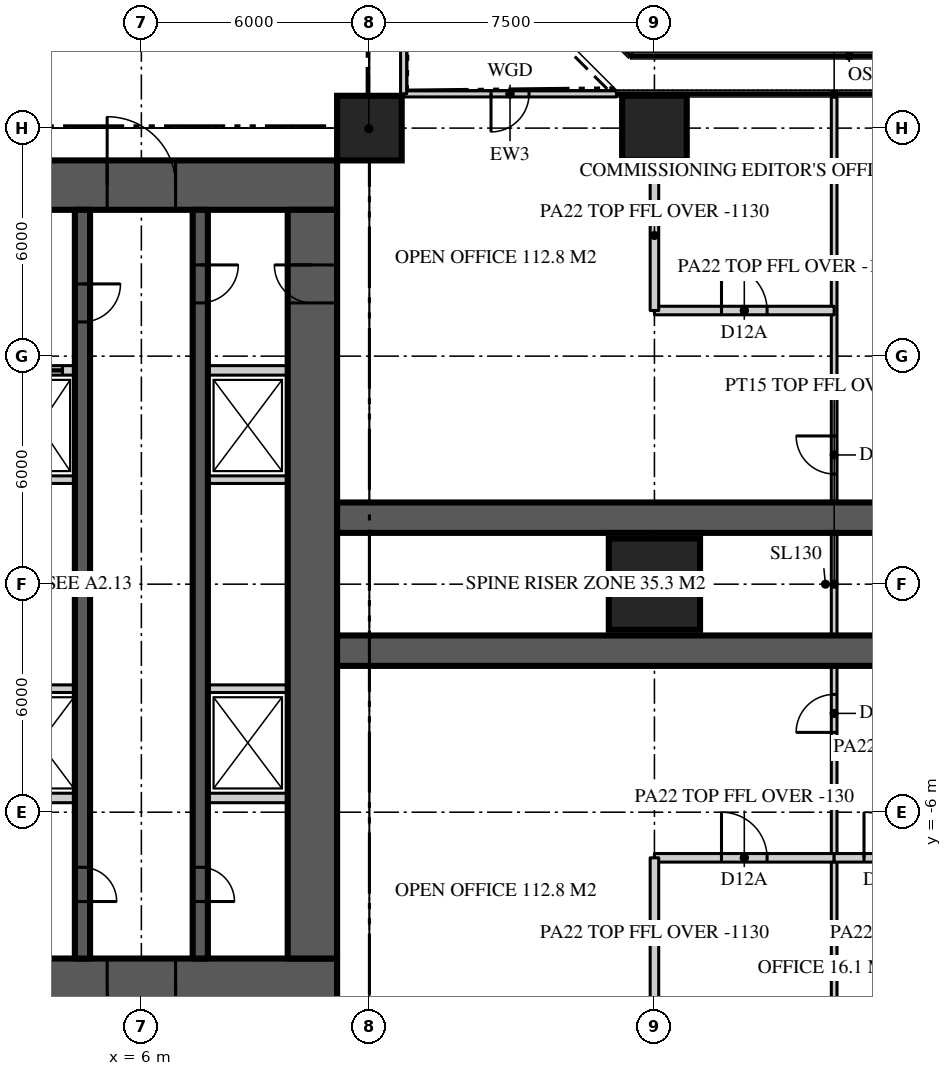
"""IFC4 building model, lengths in metres.
Left out: names, types, materials, properties, quantities, classifications, styles, units other than length and angle.
Written with IfcOpenShell. Run it as: python <this file> out.ifc"""

import sys

from ifc_helpers import new_model, si_unit, direction, frame, frame_2d, origin, origin_2d, place, context, subcontext, project, spatial, rectangle, extrude, element, fill, save


model = new_model("IFC4")
c1 = context("Model", 3, precision=1e-05, world=origin(), true_north=direction((0.0, 1.0)))
c2 = subcontext(c1, "Body", "Model", "MODEL_VIEW")
j1 = project(units=[si_unit("LENGTHUNIT", "METRE"), si_unit("PLANEANGLEUNIT", "RADIAN")], contexts=[c1])
p1 = place(None, origin())
s1 = spatial("IfcSite", under=j1, at=p1, CompositionType="ELEMENT")
p2 = place(p1, origin())
s2 = spatial("IfcBuilding", under=s1, at=p2, CompositionType="ELEMENT")
p3 = place(p2, frame((0.0, 0.0, 78.6)))
s3 = spatial("IfcBuildingStorey", under=s2, at=p3, CompositionType="ELEMENT", Elevation=78.6)
p4 = place(p3, frame((-11.15, 10.5, 0.0), z_axis=(0.0, 0.0, 1.0), x_axis=(1.0, 0.0, 0.0)))
e1 = element("IfcWall", 1, at=p4, inside=s3, PredefinedType="SHEAR", context=c2, shape_type="SweptSolid", body=[
    extrude(rectangle(XDim=22.3, YDim=1.3, at=frame_2d((11.15, 0.0))), origin(), (0.0, 0.0, 1.0), 3.9),
])
p5 = place(p4, frame((4.25, 0.0, 0.0)))
e2 = element("IfcOpeningElement", 2, at=p5, cuts=e1, PredefinedType="OPENING", context=c2, shape_type="SweptSolid", body=[
    extrude(rectangle(XDim=1.8, YDim=2.2, at=frame_2d((0.9, 1.1))), frame((0.0, 0.66, 0.0), z_axis=(0.0, -1.0, 0.0), x_axis=(1.0, 0.0, 0.0)), (0.0, 0.0, 1.0), 1.32),
])
p6 = place(p4, frame((16.25, 0.0, 0.0)))
e3 = element("IfcOpeningElement", 3, at=p6, cuts=e1, PredefinedType="OPENING", context=c2, shape_type="SweptSolid", body=[
    extrude(rectangle(XDim=1.8, YDim=2.2, at=frame_2d((0.9, 1.1))), frame((0.0, 0.66, 0.0), z_axis=(0.0, -1.0, 0.0), x_axis=(1.0, 0.0, 0.0)), (0.0, 0.0, 1.0), 1.32),
])
p7 = place(p3, frame((11.15, -10.5, 0.0), z_axis=(0.0, 0.0, 1.0), x_axis=(-1.0, 0.0, 0.0)))
e4 = element("IfcWall", 4, at=p7, inside=s3, PredefinedType="SHEAR", context=c2, shape_type="SweptSolid", body=[
    extrude(rectangle(XDim=22.3, YDim=1.3, at=frame_2d((11.15, 0.0))), origin(), (0.0, 0.0, 1.0), 3.9),
])
p8 = place(p7, frame((16.25, 0.0, 0.0)))
e5 = element("IfcOpeningElement", 5, at=p8, cuts=e4, PredefinedType="OPENING", context=c2, shape_type="SweptSolid", body=[
    extrude(rectangle(XDim=1.8, YDim=2.2, at=frame_2d((0.9, 1.1))), frame((0.0, 0.66, 0.0), z_axis=(0.0, -1.0, 0.0), x_axis=(1.0, 0.0, 0.0)), (0.0, 0.0, 1.0), 1.32),
])
p9 = place(p7, frame((4.25, 0.0, 0.0)))
e6 = element("IfcOpeningElement", 6, at=p9, cuts=e4, PredefinedType="OPENING", context=c2, shape_type="SweptSolid", body=[
    extrude(rectangle(XDim=1.8, YDim=2.2, at=frame_2d((0.9, 1.1))), frame((0.0, 0.66, 0.0), z_axis=(0.0, -1.0, 0.0), x_axis=(1.0, 0.0, 0.0)), (0.0, 0.0, 1.0), 1.32),
])
p10 = place(p3, frame((10.5, -9.85, 0.0), z_axis=(0.0, 0.0, 1.0), x_axis=(0.0, 1.0, 0.0)))
e7 = element("IfcWall", 7, at=p10, inside=s3, PredefinedType="SHEAR", context=c2, shape_type="SweptSolid", body=[
    extrude(rectangle(XDim=19.7, YDim=1.3, at=frame_2d((9.85, 0.0))), origin(), (0.0, 0.0, 1.0), 3.9),
])
p11 = place(p10, frame((17.25, 0.0, 0.0)))
e8 = element("IfcOpeningElement", 8, at=p11, cuts=e7, PredefinedType="OPENING", context=c2, shape_type="SweptSolid", body=[
    extrude(rectangle(XDim=1.0, YDim=2.2, at=frame_2d((0.5, 1.1))), frame((0.0, 0.66, 0.0), z_axis=(0.0, -1.0, 0.0), x_axis=(1.0, 0.0, 0.0)), (0.0, 0.0, 1.0), 1.32),
])
for number, where, z_axis, x_axis in (
    (9, (11.15, -1.75, 0.0), (0.0, 0.0, 1.0), (1.0, 0.0, 0.0)),
    (10, (11.15, 1.75, 0.0), (0.0, 0.0, 1.0), (1.0, 0.0, 0.0)),
):
    element("IfcWall", number, at=place(p3, frame(where, z_axis=z_axis, x_axis=x_axis)), inside=s3, PredefinedType="SHEAR", context=c2, shape_type="SweptSolid", body=[
        extrude(rectangle(XDim=15.25, YDim=0.8, at=frame_2d((7.625, 0.0))), origin(), (0.0, 0.0, 1.0), 3.9),
    ])
p12 = place(p3, frame((19.5, 0.0, 0.0), z_axis=(0.0, 0.0, 1.0), x_axis=(1.0, 0.0, 0.0)))
e11 = element("IfcColumn", 11, at=p12, inside=s3, PredefinedType="COLUMN", context=c2, shape_type="SweptSolid", body=[
    extrude(rectangle(XDim=2.4, YDim=2.4, at=origin_2d()), origin(), (0.0, 0.0, 1.0), 3.9),
])
for number, where, z_axis, x_axis in (
    (12, (12.0, 12.0, 0.0), (0.0, 0.0, 1.0), (1.0, 0.0, 0.0)),
    (13, (19.5, 12.0, 0.0), (0.0, 0.0, 1.0), (1.0, 0.0, 0.0)),
):
    element("IfcColumn", number, at=place(p3, frame(where, z_axis=z_axis, x_axis=x_axis)), inside=s3, PredefinedType="COLUMN", context=c2, shape_type="SweptSolid", body=[
        extrude(rectangle(XDim=1.7, YDim=1.7, at=origin_2d()), origin(), (0.0, 0.0, 1.0), 3.9),
    ])
p13 = place(p3, frame((18.5, 12.9, 0.0), z_axis=(0.0, 0.0, 1.0), x_axis=(-1.0, 0.0, 0.0)))
e14 = element("IfcWall", 14, at=p13, inside=s3, PredefinedType="SOLIDWALL", context=c2, shape_type="SweptSolid", body=[
    extrude(rectangle(XDim=5.6, YDim=0.16, at=frame_2d((2.8, 0.0))), origin(), (0.0, 0.0, 1.0), 3.77),
])
p14 = place(p13, frame((2.3, 0.0, 0.0)))
e15 = element("IfcOpeningElement", 15, at=p14, cuts=e14, PredefinedType="OPENING", context=c2, shape_type="SweptSolid", body=[
    extrude(rectangle(XDim=1.0, YDim=2.2, at=frame_2d((0.5, 1.1))), frame((0.0, 0.09, 0.0), z_axis=(0.0, -1.0, 0.0), x_axis=(1.0, 0.0, 0.0)), (0.0, 0.0, 1.0), 0.18),
])
p15 = place(p3, frame((12.9, 12.9, 0.0), z_axis=(0.0, 0.0, 1.0), x_axis=(0.0, 1.0, 0.0)))
e16 = element("IfcWall", 16, at=p15, inside=s3, PredefinedType="SOLIDWALL", context=c2, shape_type="SweptSolid", body=[
    extrude(rectangle(XDim=5.6, YDim=0.16, at=frame_2d((2.8, 0.0))), origin(), (0.0, 0.0, 1.0), 3.77),
])
p16 = place(p3, frame((7.55, 9.85, 0.0), z_axis=(0.0, 0.0, 1.0), x_axis=(0.0, -1.0, 0.0)))
e17 = element("IfcWall", 17, at=p16, inside=s3, PredefinedType="SHEAR", context=c2, shape_type="SweptSolid", body=[
    extrude(rectangle(XDim=19.7, YDim=0.4, at=frame_2d((9.85, 0.0))), origin(), (0.0, 0.0, 1.0), 3.9),
])
p17 = place(p16, frame((1.45, 0.0, 0.0)))
e18 = element("IfcOpeningElement", 18, at=p17, cuts=e17, PredefinedType="OPENING", context=c2, shape_type="SweptSolid", body=[
    extrude(rectangle(XDim=1.0, YDim=2.2, at=frame_2d((0.5, 1.1))), frame((0.0, 0.21, 0.0), z_axis=(0.0, -1.0, 0.0), x_axis=(1.0, 0.0, 0.0)), (0.0, 0.0, 1.0), 0.42),
])
p18 = place(p16, frame((17.3, 0.0, 0.0)))
e19 = element("IfcOpeningElement", 19, at=p18, cuts=e17, PredefinedType="OPENING", context=c2, shape_type="SweptSolid", body=[
    extrude(rectangle(XDim=0.9, YDim=2.1, at=frame_2d((0.45, 1.05))), frame((0.0, 0.21, 0.0), z_axis=(0.0, -1.0, 0.0), x_axis=(1.0, 0.0, 0.0)), (0.0, 0.0, 1.0), 0.42),
])
p19 = place(p3, frame((4.45, 9.85, 0.0), z_axis=(0.0, 0.0, 1.0), x_axis=(0.0, -1.0, 0.0)))
e20 = element("IfcWall", 20, at=p19, inside=s3, PredefinedType="SHEAR", context=c2, shape_type="SweptSolid", body=[
    extrude(rectangle(XDim=19.7, YDim=0.4, at=frame_2d((9.85, 0.0))), origin(), (0.0, 0.0, 1.0), 3.9),
])
p20 = place(p19, frame((1.95, 0.0, 0.0)))
e21 = element("IfcOpeningElement", 21, at=p20, cuts=e20, PredefinedType="OPENING", context=c2, shape_type="SweptSolid", body=[
    extrude(rectangle(XDim=1.0, YDim=2.2, at=frame_2d((0.5, 1.1))), frame((0.0, 0.21, 0.0), z_axis=(0.0, -1.0, 0.0), x_axis=(1.0, 0.0, 0.0)), (0.0, 0.0, 1.0), 0.42),
])
p21 = place(p19, frame((17.3, 0.0, 0.0)))
e22 = element("IfcOpeningElement", 22, at=p21, cuts=e20, PredefinedType="OPENING", context=c2, shape_type="SweptSolid", body=[
    extrude(rectangle(XDim=0.9, YDim=2.1, at=frame_2d((0.45, 1.05))), frame((0.0, 0.21, 0.0), z_axis=(0.0, -1.0, 0.0), x_axis=(1.0, 0.0, 0.0)), (0.0, 0.0, 1.0), 0.42),
])
p22 = place(p3, frame((2.4, 5.625, 0.0), z_axis=(0.0, 0.0, 1.0), x_axis=(1.0, 0.0, 0.0)))
e23 = element("IfcWall", 23, at=p22, inside=s3, PredefinedType="SOLIDWALL", context=c2, shape_type="SweptSolid", body=[
    extrude(rectangle(XDim=1.85, YDim=0.25, at=frame_2d((0.925, 0.0))), origin(), (0.0, 0.0, 1.0), 3.7),
])
p23 = place(p22, frame((0.325, 0.0, 0.0)))
e24 = element("IfcOpeningElement", 24, at=p23, cuts=e23, PredefinedType="OPENING", context=c2, shape_type="SweptSolid", body=[
    extrude(rectangle(XDim=1.2, YDim=2.2, at=frame_2d((0.6, 1.1))), frame((0.0, 0.135, 0.0), z_axis=(0.0, -1.0, 0.0), x_axis=(1.0, 0.0, 0.0)), (0.0, 0.0, 1.0), 0.27),
])
p24 = place(p3, frame((7.75, 5.625, 0.0), z_axis=(0.0, 0.0, 1.0), x_axis=(1.0, 0.0, 0.0)))
e25 = element("IfcWall", 25, at=p24, inside=s3, PredefinedType="SOLIDWALL", context=c2, shape_type="SweptSolid", body=[
    extrude(rectangle(XDim=2.1, YDim=0.25, at=frame_2d((1.05, 0.0))), origin(), (0.0, 0.0, 1.0), 3.7),
])
p25 = place(p3, frame((2.4, -5.625, 0.0), z_axis=(0.0, 0.0, 1.0), x_axis=(1.0, 0.0, 0.0)))
e26 = element("IfcWall", 26, at=p25, inside=s3, PredefinedType="SOLIDWALL", context=c2, shape_type="SweptSolid", body=[
    extrude(rectangle(XDim=1.85, YDim=0.25, at=frame_2d((0.925, 0.0))), origin(), (0.0, 0.0, 1.0), 3.7),
])
p26 = place(p3, frame((7.75, -5.625, 0.0), z_axis=(0.0, 0.0, 1.0), x_axis=(1.0, 0.0, 0.0)))
e27 = element("IfcWall", 27, at=p26, inside=s3, PredefinedType="SOLIDWALL", context=c2, shape_type="SweptSolid", body=[
    extrude(rectangle(XDim=2.1, YDim=0.25, at=frame_2d((1.05, 0.0))), origin(), (0.0, 0.0, 1.0), 3.7),
])
p27 = place(p3, frame((2.4, -2.75, 0.0), z_axis=(0.0, 0.0, 1.0), x_axis=(1.0, 0.0, 0.0)))
e28 = element("IfcWall", 28, at=p27, inside=s3, PredefinedType="SOLIDWALL", context=c2, shape_type="SweptSolid", body=[
    extrude(rectangle(XDim=1.85, YDim=0.2, at=frame_2d((0.925, 0.0))), origin(), (0.0, 0.0, 1.0), 3.7),
])
p28 = place(p3, frame((7.75, -2.75, 0.0), z_axis=(0.0, 0.0, 1.0), x_axis=(1.0, 0.0, 0.0)))
e29 = element("IfcWall", 29, at=p28, inside=s3, PredefinedType="SOLIDWALL", context=c2, shape_type="SweptSolid", body=[
    extrude(rectangle(XDim=2.1, YDim=0.2, at=frame_2d((1.05, 0.0))), origin(), (0.0, 0.0, 1.0), 3.7),
])
p29 = place(p3, frame((2.4, 2.75, 0.0), z_axis=(0.0, 0.0, 1.0), x_axis=(1.0, 0.0, 0.0)))
e30 = element("IfcWall", 30, at=p29, inside=s3, PredefinedType="SOLIDWALL", context=c2, shape_type="SweptSolid", body=[
    extrude(rectangle(XDim=1.85, YDim=0.2, at=frame_2d((0.925, 0.0))), origin(), (0.0, 0.0, 1.0), 3.7),
])
p30 = place(p3, frame((7.75, 2.75, 0.0), z_axis=(0.0, 0.0, 1.0), x_axis=(1.0, 0.0, 0.0)))
e31 = element("IfcWall", 31, at=p30, inside=s3, PredefinedType="SOLIDWALL", context=c2, shape_type="SweptSolid", body=[
    extrude(rectangle(XDim=2.1, YDim=0.2, at=frame_2d((1.05, 0.0))), origin(), (0.0, 0.0, 1.0), 3.7),
])
p31 = place(p3, frame((24.229, -12.82, 0.0), z_axis=(0.0, 0.0, 1.0), x_axis=(0.0, 1.0, 0.0)))
e32 = element("IfcWall", 32, at=p31, inside=s3, PredefinedType="PARTITIONING", context=c2, shape_type="SweptSolid", body=[
    extrude(rectangle(XDim=25.64, YDim=0.15, at=frame_2d((12.82, 0.0))), origin(), (0.0, 0.0, 1.0), 3.77),
])
p32 = place(p31, frame((15.72, 0.0, 0.0)))
e33 = element("IfcOpeningElement", 33, at=p32, cuts=e32, PredefinedType="OPENING", context=c2, shape_type="SweptSolid", body=[
    extrude(rectangle(XDim=1.0, YDim=2.2, at=frame_2d((0.5, 1.1))), frame((0.0, 0.085, 0.0), z_axis=(0.0, -1.0, 0.0), x_axis=(1.0, 0.0, 0.0)), (0.0, 0.0, 1.0), 0.17),
])
p33 = place(p31, frame((8.92, 0.0, 0.0)))
e34 = element("IfcOpeningElement", 34, at=p33, cuts=e32, PredefinedType="OPENING", context=c2, shape_type="SweptSolid", body=[
    extrude(rectangle(XDim=1.0, YDim=2.2, at=frame_2d((0.5, 1.1))), frame((0.0, 0.085, 0.0), z_axis=(0.0, -1.0, 0.0), x_axis=(1.0, 0.0, 0.0)), (0.0, 0.0, 1.0), 0.17),
])
p34 = place(p3, frame((19.5, 7.2, 0.0), z_axis=(0.0, 0.0, 1.0), x_axis=(1.0, 0.0, 0.0)))
e35 = element("IfcWall", 35, at=p34, inside=s3, PredefinedType="PARTITIONING", context=c2, shape_type="SweptSolid", body=[
    extrude(rectangle(XDim=4.729, YDim=0.225, at=frame_2d((2.365, 0.0))), origin(), (0.0, 0.0, 1.0), 3.77),
])
p35 = place(p34, frame((1.764, 0.0, 0.0)))
e36 = element("IfcOpeningElement", 36, at=p35, cuts=e35, PredefinedType="OPENING", context=c2, shape_type="SweptSolid", body=[
    extrude(rectangle(XDim=1.2, YDim=2.2, at=frame_2d((0.6, 1.1))), frame((0.0, 0.123, 0.0), z_axis=(0.0, -1.0, 0.0), x_axis=(1.0, 0.0, 0.0)), (0.0, 0.0, 1.0), 0.245),
])
p36 = place(p3, frame((19.5, 7.2, 0.0), z_axis=(0.0, 0.0, 1.0), x_axis=(0.0, 1.0, 0.0)))
e37 = element("IfcWall", 37, at=p36, inside=s3, PredefinedType="PARTITIONING", context=c2, shape_type="SweptSolid", body=[
    extrude(rectangle(XDim=3.95, YDim=0.225, at=frame_2d((1.975, 0.0))), origin(), (0.0, 0.0, 1.0), 2.77),
])
p37 = place(p3, frame((19.5, -7.2, 0.0), z_axis=(0.0, 0.0, 1.0), x_axis=(1.0, 0.0, 0.0)))
e38 = element("IfcWall", 38, at=p37, inside=s3, PredefinedType="PARTITIONING", context=c2, shape_type="SweptSolid", body=[
    extrude(rectangle(XDim=4.729, YDim=0.225, at=frame_2d((2.365, 0.0))), origin(), (0.0, 0.0, 1.0), 3.77),
])
p38 = place(p37, frame((1.764, 0.0, 0.0)))
e39 = element("IfcOpeningElement", 39, at=p38, cuts=e38, PredefinedType="OPENING", context=c2, shape_type="SweptSolid", body=[
    extrude(rectangle(XDim=1.2, YDim=2.2, at=frame_2d((0.6, 1.1))), frame((0.0, 0.123, 0.0), z_axis=(0.0, -1.0, 0.0), x_axis=(1.0, 0.0, 0.0)), (0.0, 0.0, 1.0), 0.245),
])
p39 = place(p3, frame((24.229, -7.2, 0.0), z_axis=(0.0, 0.0, 1.0), x_axis=(1.0, 0.0, 0.0)))
e40 = element("IfcWall", 40, at=p39, inside=s3, PredefinedType="PARTITIONING", context=c2, shape_type="SweptSolid", body=[
    extrude(rectangle(XDim=5.73, YDim=0.225, at=frame_2d((2.865, 0.0))), origin(), (0.0, 0.0, 1.0), 3.77),
])
p40 = place(p39, frame((0.785, 0.0, 0.0)))
e41 = element("IfcOpeningElement", 41, at=p40, cuts=e40, PredefinedType="OPENING", context=c2, shape_type="SweptSolid", body=[
    extrude(rectangle(XDim=1.2, YDim=2.2, at=frame_2d((0.6, 1.1))), frame((0.0, 0.123, 0.0), z_axis=(0.0, -1.0, 0.0), x_axis=(1.0, 0.0, 0.0)), (0.0, 0.0, 1.0), 0.245),
])
p41 = place(p39, frame((3.65, 0.0, 0.0)))
e42 = element("IfcOpeningElement", 42, at=p41, cuts=e40, PredefinedType="OPENING", context=c2, shape_type="SweptSolid", body=[
    extrude(rectangle(XDim=1.2, YDim=2.2, at=frame_2d((0.6, 1.1))), frame((0.0, 0.123, 0.0), z_axis=(0.0, -1.0, 0.0), x_axis=(1.0, 0.0, 0.0)), (0.0, 0.0, 1.0), 0.245),
])
p42 = place(p3, frame((19.5, -7.2, 0.0), z_axis=(0.0, 0.0, 1.0), x_axis=(0.0, -1.0, 0.0)))
e43 = element("IfcWall", 43, at=p42, inside=s3, PredefinedType="PARTITIONING", context=c2, shape_type="SweptSolid", body=[
    extrude(rectangle(XDim=3.95, YDim=0.225, at=frame_2d((1.975, 0.0))), origin(), (0.0, 0.0, 1.0), 2.77),
])
p43 = place(p3, frame((11.15, 11.15, 0.0), z_axis=(0.0, 0.0, 1.0), x_axis=(0.707106781187, 0.707106781187, 0.0)))
e44 = element("IfcWall", 44, at=p43, inside=s3, PredefinedType="PARTITIONING", context=c2, shape_type="SweptSolid", body=[
    extrude(rectangle(XDim=2.362, YDim=0.15, at=frame_2d((1.181, 0.0))), origin(), (0.0, 0.0, 1.0), 3.22),
])
p44 = place(p14, origin())
e45 = element("IfcDoor", 45, at=p44, inside=s3, OperationType="SINGLE_SWING_RIGHT", PredefinedType="DOOR", context=c2, shape_type="SweptSolid", body=[
    extrude(rectangle(XDim=1.0, YDim=2.2, at=frame_2d((0.5, 1.1))), frame((0.0, 0.025, 0.0), z_axis=(0.0, -1.0, 0.0), x_axis=(1.0, 0.0, 0.0)), (0.0, 0.0, 1.0), 0.05),
])
fill(e15, e45)
p45 = place(p6, origin())
e46 = element("IfcDoor", 46, at=p45, inside=s3, OperationType="DOUBLE_DOOR_DOUBLE_SWING", PredefinedType="DOOR", context=c2, shape_type="SweptSolid", body=[
    extrude(rectangle(XDim=1.8, YDim=2.2, at=frame_2d((0.9, 1.1))), frame((0.0, 0.025, 0.0), z_axis=(0.0, -1.0, 0.0), x_axis=(1.0, 0.0, 0.0)), (0.0, 0.0, 1.0), 0.05),
])
fill(e3, e46)
p46 = place(p9, origin())
e47 = element("IfcDoor", 47, at=p46, inside=s3, OperationType="DOUBLE_DOOR_DOUBLE_SWING", PredefinedType="DOOR", context=c2, shape_type="SweptSolid", body=[
    extrude(rectangle(XDim=1.8, YDim=2.2, at=frame_2d((0.9, 1.1))), frame((0.0, 0.025, 0.0), z_axis=(0.0, -1.0, 0.0), x_axis=(1.0, 0.0, 0.0)), (0.0, 0.0, 1.0), 0.05),
])
fill(e6, e47)
p47 = place(p17, origin())
e48 = element("IfcDoor", 48, at=p47, inside=s3, OperationType="SINGLE_SWING_LEFT", PredefinedType="DOOR", context=c2, shape_type="SweptSolid", body=[
    extrude(rectangle(XDim=1.0, YDim=2.2, at=frame_2d((0.5, 1.1))), frame((0.0, 0.025, 0.0), z_axis=(0.0, -1.0, 0.0), x_axis=(1.0, 0.0, 0.0)), (0.0, 0.0, 1.0), 0.05),
])
fill(e18, e48)
p48 = place(p11, origin())
e49 = element("IfcDoor", 49, at=p48, inside=s3, OperationType="SINGLE_SWING_RIGHT", PredefinedType="DOOR", context=c2, shape_type="SweptSolid", body=[
    extrude(rectangle(XDim=1.0, YDim=2.2, at=frame_2d((0.5, 1.1))), frame((0.0, 0.025, 0.0), z_axis=(0.0, -1.0, 0.0), x_axis=(1.0, 0.0, 0.0)), (0.0, 0.0, 1.0), 0.05),
])
fill(e8, e49)
p49 = place(p20, origin())
e50 = element("IfcDoor", 50, at=p49, inside=s3, OperationType="SINGLE_SWING_LEFT", PredefinedType="DOOR", context=c2, shape_type="SweptSolid", body=[
    extrude(rectangle(XDim=1.0, YDim=2.2, at=frame_2d((0.5, 1.1))), frame((0.0, 0.025, 0.0), z_axis=(0.0, -1.0, 0.0), x_axis=(1.0, 0.0, 0.0)), (0.0, 0.0, 1.0), 0.05),
])
fill(e21, e50)
p50 = place(p18, origin())
e51 = element("IfcDoor", 51, at=p50, inside=s3, OperationType="SINGLE_SWING_RIGHT", PredefinedType="DOOR", context=c2, shape_type="SweptSolid", body=[
    extrude(rectangle(XDim=0.9, YDim=2.1, at=frame_2d((0.45, 1.05))), frame((0.0, 0.025, 0.0), z_axis=(0.0, -1.0, 0.0), x_axis=(1.0, 0.0, 0.0)), (0.0, 0.0, 1.0), 0.05),
])
fill(e19, e51)
p51 = place(p21, origin())
e52 = element("IfcDoor", 52, at=p51, inside=s3, OperationType="SINGLE_SWING_RIGHT", PredefinedType="DOOR", context=c2, shape_type="SweptSolid", body=[
    extrude(rectangle(XDim=0.9, YDim=2.1, at=frame_2d((0.45, 1.05))), frame((0.0, 0.025, 0.0), z_axis=(0.0, -1.0, 0.0), x_axis=(1.0, 0.0, 0.0)), (0.0, 0.0, 1.0), 0.05),
])
fill(e22, e52)
p52 = place(p23, origin())
e53 = element("IfcDoor", 53, at=p52, inside=s3, OperationType="SLIDING_TO_LEFT", PredefinedType="DOOR", context=c2, shape_type="SweptSolid", body=[
    extrude(rectangle(XDim=1.2, YDim=2.2, at=frame_2d((0.6, 1.1))), frame((0.0, 0.025, 0.0), z_axis=(0.0, -1.0, 0.0), x_axis=(1.0, 0.0, 0.0)), (0.0, 0.0, 1.0), 0.05),
])
fill(e24, e53)
p53 = place(p32, origin())
e54 = element("IfcDoor", 54, at=p53, inside=s3, OperationType="SINGLE_SWING_RIGHT", PredefinedType="DOOR", context=c2, shape_type="SweptSolid", body=[
    extrude(rectangle(XDim=1.0, YDim=2.2, at=frame_2d((0.5, 1.1))), frame((0.0, 0.025, 0.0), z_axis=(0.0, -1.0, 0.0), x_axis=(1.0, 0.0, 0.0)), (0.0, 0.0, 1.0), 0.05),
])
fill(e33, e54)
p54 = place(p33, origin())
e55 = element("IfcDoor", 55, at=p54, inside=s3, OperationType="SINGLE_SWING_LEFT", PredefinedType="DOOR", context=c2, shape_type="SweptSolid", body=[
    extrude(rectangle(XDim=1.0, YDim=2.2, at=frame_2d((0.5, 1.1))), frame((0.0, 0.025, 0.0), z_axis=(0.0, -1.0, 0.0), x_axis=(1.0, 0.0, 0.0)), (0.0, 0.0, 1.0), 0.05),
])
fill(e34, e55)
p55 = place(p35, origin())
e56 = element("IfcDoor", 56, at=p55, inside=s3, OperationType="SINGLE_SWING_LEFT", PredefinedType="DOOR", context=c2, shape_type="SweptSolid", body=[
    extrude(rectangle(XDim=1.2, YDim=2.2, at=frame_2d((0.6, 1.1))), frame((0.0, 0.025, 0.0), z_axis=(0.0, -1.0, 0.0), x_axis=(1.0, 0.0, 0.0)), (0.0, 0.0, 1.0), 0.05),
])
fill(e36, e56)
p56 = place(p38, origin())
e57 = element("IfcDoor", 57, at=p56, inside=s3, OperationType="SINGLE_SWING_LEFT", PredefinedType="DOOR", context=c2, shape_type="SweptSolid", body=[
    extrude(rectangle(XDim=1.2, YDim=2.2, at=frame_2d((0.6, 1.1))), frame((0.0, 0.025, 0.0), z_axis=(0.0, -1.0, 0.0), x_axis=(1.0, 0.0, 0.0)), (0.0, 0.0, 1.0), 0.05),
])
fill(e39, e57)
p57 = place(p40, origin())
e58 = element("IfcDoor", 58, at=p57, inside=s3, OperationType="SINGLE_SWING_LEFT", PredefinedType="DOOR", context=c2, shape_type="SweptSolid", body=[
    extrude(rectangle(XDim=1.2, YDim=2.2, at=frame_2d((0.6, 1.1))), frame((0.0, 0.025, 0.0), z_axis=(0.0, -1.0, 0.0), x_axis=(1.0, 0.0, 0.0)), (0.0, 0.0, 1.0), 0.05),
])
fill(e41, e58)
save(model, sys.argv[1])
